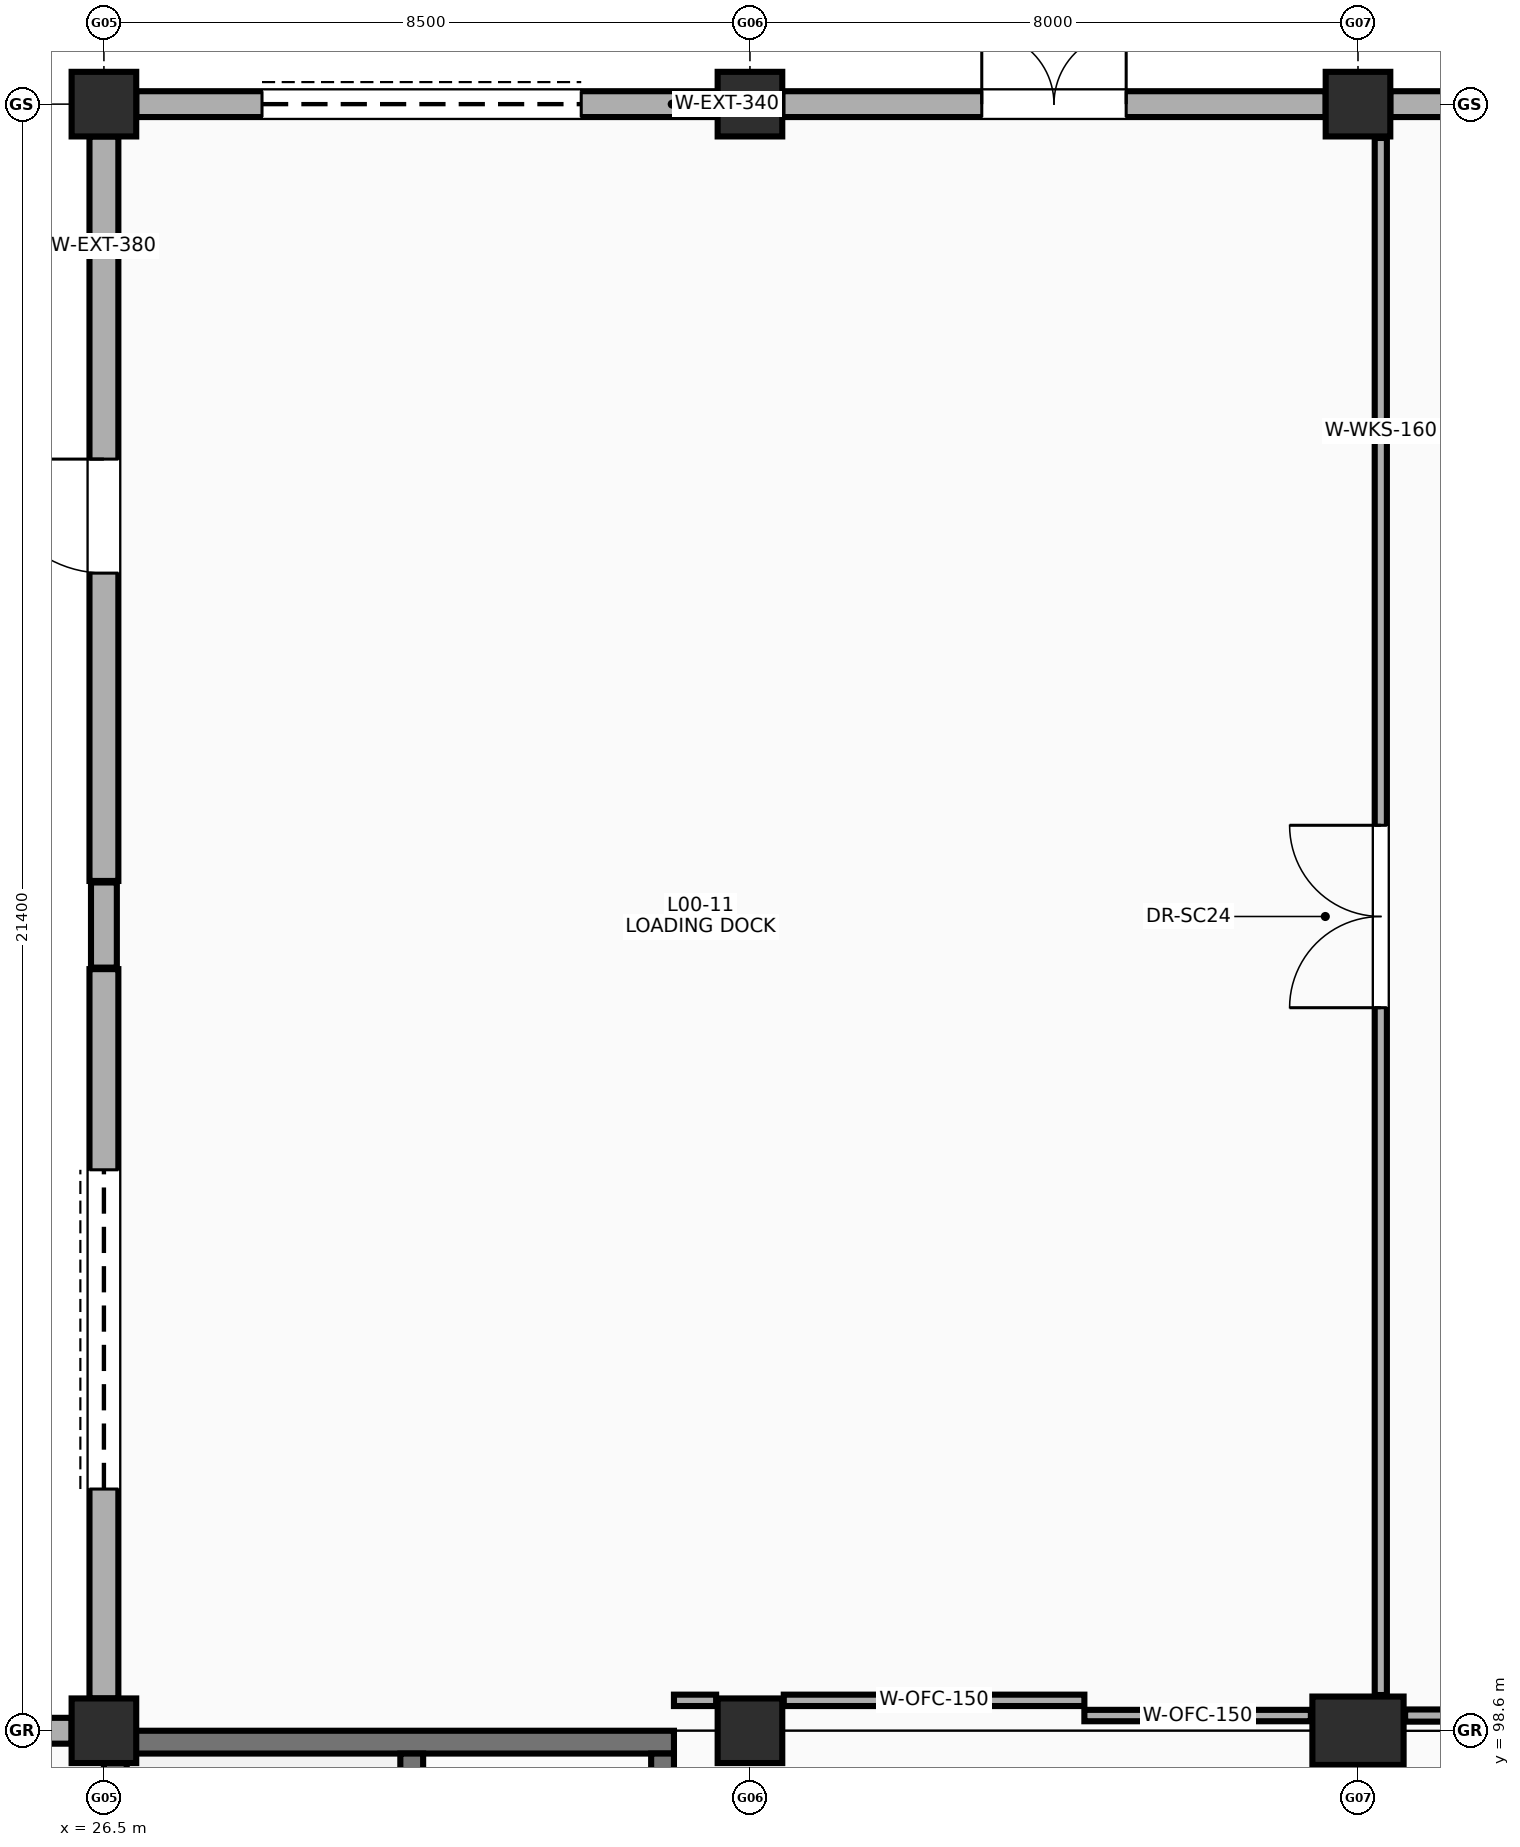
"""IFC4 building model, lengths in metres.
Left out: names, types, materials, properties, quantities, classifications, styles, units other than length and angle.
Written with IfcOpenShell. Run it as: python <this file> out.ifc"""

import sys

from ifc_helpers import new_model, si_unit, direction, frame, frame_2d, origin, origin_2d, place, context, subcontext, project, spatial, rectangle, extrude, element, fill, save


model = new_model("IFC4")
c1 = context("Model", 3, precision=1e-05, world=origin(), true_north=direction((0.0, 1.0)))
c2 = subcontext(c1, "Body", "Model", "MODEL_VIEW")
j1 = project(units=[si_unit("LENGTHUNIT", "METRE"), si_unit("PLANEANGLEUNIT", "RADIAN")], contexts=[c1])
p1 = place(None, origin())
s1 = spatial("IfcSite", under=j1, at=p1, CompositionType="ELEMENT")
p2 = place(p1, origin())
s2 = spatial("IfcBuilding", under=s1, at=p2, CompositionType="ELEMENT")
p3 = place(p2, origin())
s3 = spatial("IfcBuildingStorey", under=s2, at=p3, CompositionType="ELEMENT", Elevation=0.0)
for number, where, z_axis, x_axis in (
    (1, (26.5, 98.6, 0.0), (0.0, 0.0, 1.0), (1.0, 0.0, 0.0)),
    (2, (26.5, 120.0, 0.0), (0.0, 0.0, 1.0), (1.0, 0.0, 0.0)),
    (3, (35.0, 98.6, 0.0), (0.0, 0.0, 1.0), (1.0, 0.0, 0.0)),
    (4, (35.0, 120.0, 0.0), (0.0, 0.0, 1.0), (1.0, 0.0, 0.0)),
):
    element("IfcColumn", number, at=place(p3, frame(where, z_axis=z_axis, x_axis=x_axis)), inside=s3, PredefinedType="COLUMN", context=c2, shape_type="SweptSolid", body=[
        extrude(rectangle(XDim=0.85, YDim=0.85, at=origin_2d()), origin(), (0.0, 0.0, 1.0), 5.4),
    ])
p4 = place(p3, frame((43.0, 98.6, 0.0), z_axis=(0.0, 0.0, 1.0), x_axis=(1.0, 0.0, 0.0)))
e5 = element("IfcColumn", 5, at=p4, inside=s3, PredefinedType="COLUMN", context=c2, shape_type="SweptSolid", body=[
    extrude(rectangle(XDim=1.2, YDim=0.9, at=origin_2d()), origin(), (0.0, 0.0, 1.0), 5.4),
])
p5 = place(p3, frame((43.0, 120.0, 0.0), z_axis=(0.0, 0.0, 1.0), x_axis=(1.0, 0.0, 0.0)))
e6 = element("IfcColumn", 6, at=p5, inside=s3, PredefinedType="COLUMN", context=c2, shape_type="SweptSolid", body=[
    extrude(rectangle(XDim=0.85, YDim=0.85, at=origin_2d()), origin(), (0.0, 0.0, 1.0), 5.4),
])
p6 = place(p3, frame((26.5, 98.45, 0.0), z_axis=(0.0, 0.0, 1.0), x_axis=(1.0, 0.0, 0.0)))
e7 = element("IfcWall", 7, at=p6, inside=s3, PredefinedType="SHEAR", context=c2, shape_type="SweptSolid", body=[
    extrude(rectangle(XDim=7.5, YDim=0.3, at=frame_2d((3.75, 0.0))), origin(), (0.0, 0.0, 1.0), 5.4),
])
for number, where, z_axis, x_axis in (
    (8, (26.65, 90.1, 0.0), (0.0, 0.0, 1.0), (0.0, 1.0, 0.0)),
    (9, (33.85, 90.1, 0.0), (0.0, 0.0, 1.0), (0.0, 1.0, 0.0)),
    (10, (30.55, 90.1, 0.0), (0.0, 0.0, 1.0), (0.0, 1.0, 0.0)),
):
    element("IfcWall", number, at=place(p3, frame(where, z_axis=z_axis, x_axis=x_axis)), inside=s3, PredefinedType="SHEAR", context=c2, shape_type="SweptSolid", body=[
        extrude(rectangle(XDim=8.2, YDim=0.3, at=frame_2d((4.1, 0.0))), origin(), (0.0, 0.0, 1.0), 5.4),
    ])
p7 = place(p3, frame((26.925, 120.0, 0.0), z_axis=(0.0, 0.0, 1.0), x_axis=(1.0, 0.0, 0.0)))
e11 = element("IfcWall", 11, at=p7, inside=s3, PredefinedType="SOLIDWALL", context=c2, shape_type="SweptSolid", body=[
    extrude(rectangle(XDim=7.65, YDim=0.34, at=frame_2d((3.825, 0.0))), origin(), (0.0, 0.0, 1.0), 3.9),
])
p8 = place(p7, frame((1.655, 0.0, 0.0)))
e12 = element("IfcOpeningElement", 12, at=p8, cuts=e11, PredefinedType="OPENING", context=c2, shape_type="SweptSolid", body=[
    extrude(rectangle(XDim=4.2, YDim=3.6, at=frame_2d((2.1, 1.8))), frame((0.0, 0.18, 0.0), z_axis=(0.0, -1.0, 0.0), x_axis=(1.0, 0.0, 0.0)), (0.0, 0.0, 1.0), 0.36),
])
p9 = place(p3, frame((35.425, 120.0, 0.0), z_axis=(0.0, 0.0, 1.0), x_axis=(1.0, 0.0, 0.0)))
e13 = element("IfcWall", 13, at=p9, inside=s3, PredefinedType="SOLIDWALL", context=c2, shape_type="SweptSolid", body=[
    extrude(rectangle(XDim=7.15, YDim=0.34, at=frame_2d((3.575, 0.0))), origin(), (0.0, 0.0, 1.0), 3.9),
])
p10 = place(p9, frame((2.625, 0.0, 0.0)))
e14 = element("IfcOpeningElement", 14, at=p10, cuts=e13, PredefinedType="OPENING", context=c2, shape_type="SweptSolid", body=[
    extrude(rectangle(XDim=1.9, YDim=2.35, at=frame_2d((0.95, 1.175))), frame((0.0, 0.18, 0.0), z_axis=(0.0, -1.0, 0.0), x_axis=(1.0, 0.0, 0.0)), (0.0, 0.0, 1.0), 0.36),
])
p11 = place(p3, frame((43.425, 120.0, 0.0), z_axis=(0.0, 0.0, 1.0), x_axis=(1.0, 0.0, 0.0)))
e15 = element("IfcWall", 15, at=p11, inside=s3, PredefinedType="SOLIDWALL", context=c2, shape_type="SweptSolid", body=[
    extrude(rectangle(XDim=6.65, YDim=0.34, at=frame_2d((3.325, 0.0))), origin(), (0.0, 0.0, 1.0), 3.9),
])
p12 = place(p11, frame((1.405, 0.0, 0.0)))
e16 = element("IfcOpeningElement", 16, at=p12, cuts=e15, PredefinedType="OPENING", context=c2, shape_type="SweptSolid", body=[
    extrude(rectangle(XDim=3.8, YDim=3.5, at=frame_2d((1.9, 1.75))), frame((0.0, 0.18, 0.0), z_axis=(0.0, -1.0, 0.0), x_axis=(1.0, 0.0, 0.0)), (0.0, 0.0, 1.0), 0.36),
])
p13 = place(p3, frame((26.5, 99.025, 0.0), z_axis=(0.0, 0.0, 1.0), x_axis=(0.0, 1.0, 0.0)))
e17 = element("IfcWall", 17, at=p13, inside=s3, PredefinedType="SOLIDWALL", context=c2, shape_type="SweptSolid", body=[
    extrude(rectangle(XDim=9.595, YDim=0.38, at=frame_2d((4.798, 0.0))), origin(), (0.0, 0.0, 1.0), 3.9),
])
p14 = place(p13, frame((2.755, 0.0, 0.0)))
e18 = element("IfcOpeningElement", 18, at=p14, cuts=e17, PredefinedType="OPENING", context=c2, shape_type="SweptSolid", body=[
    extrude(rectangle(XDim=4.2, YDim=3.6, at=frame_2d((2.1, 1.8))), frame((0.0, 0.2, 0.0), z_axis=(0.0, -1.0, 0.0), x_axis=(1.0, 0.0, 0.0)), (0.0, 0.0, 1.0), 0.4),
])
p15 = place(p3, frame((26.5, 109.78, 0.0), z_axis=(0.0, 0.0, 1.0), x_axis=(0.0, 1.0, 0.0)))
e19 = element("IfcWall", 19, at=p15, inside=s3, PredefinedType="SOLIDWALL", context=c2, shape_type="SweptSolid", body=[
    extrude(rectangle(XDim=9.795, YDim=0.38, at=frame_2d((4.897, 0.0))), origin(), (0.0, 0.0, 1.0), 3.9),
])
p16 = place(p15, frame((4.05, 0.0, 0.0)))
e20 = element("IfcOpeningElement", 20, at=p16, cuts=e19, PredefinedType="OPENING", context=c2, shape_type="SweptSolid", body=[
    extrude(rectangle(XDim=1.5, YDim=2.25, at=frame_2d((0.75, 1.125))), frame((0.0, 0.2, 0.0), z_axis=(0.0, -1.0, 0.0), x_axis=(1.0, 0.0, 0.0)), (0.0, 0.0, 1.0), 0.4),
])
p17 = place(p3, frame((19.425, 98.6, 0.0), z_axis=(0.0, 0.0, 1.0), x_axis=(1.0, 0.0, 0.0)))
e21 = element("IfcWall", 21, at=p17, inside=s3, PredefinedType="SOLIDWALL", context=c2, shape_type="SweptSolid", body=[
    extrude(rectangle(XDim=6.65, YDim=0.34, at=frame_2d((3.325, 0.0))), origin(), (0.0, 0.0, 1.0), 3.9),
])
p18 = place(p3, frame((43.3, 99.07, 0.0), z_axis=(0.0, 0.0, 1.0), x_axis=(0.0, 1.0, 0.0)))
e22 = element("IfcWall", 22, at=p18, inside=s3, PredefinedType="PARTITIONING", context=c2, shape_type="SweptSolid", body=[
    extrude(rectangle(XDim=20.485, YDim=0.16, at=frame_2d((10.242, 0.0))), origin(), (0.0, 0.0, 1.0), 3.9),
])
p19 = place(p18, frame((9.042, 0.0, 0.0)))
e23 = element("IfcOpeningElement", 23, at=p19, cuts=e22, PredefinedType="OPENING", context=c2, shape_type="SweptSolid", body=[
    extrude(rectangle(XDim=2.4, YDim=2.6, at=frame_2d((1.2, 1.3))), frame((0.0, 0.09, 0.0), z_axis=(0.0, -1.0, 0.0), x_axis=(1.0, 0.0, 0.0)), (0.0, 0.0, 1.0), 0.18),
])
p20 = place(p3, frame((43.62, 98.8, 0.0), z_axis=(0.0, 0.0, 1.0), x_axis=(1.0, 0.0, 0.0)))
e24 = element("IfcWall", 24, at=p20, inside=s3, PredefinedType="PARTITIONING", context=c2, shape_type="SweptSolid", body=[
    extrude(rectangle(XDim=6.435, YDim=0.16, at=frame_2d((3.217, 0.0))), origin(), (0.0, 0.0, 1.0), 3.9),
])
p21 = place(p3, frame((39.4, 98.8, 0.0), z_axis=(0.0, 0.0, 1.0), x_axis=(1.0, 0.0, 0.0)))
e25 = element("IfcWall", 25, at=p21, inside=s3, PredefinedType="PARTITIONING", context=c2, shape_type="SweptSolid", body=[
    extrude(rectangle(XDim=2.98, YDim=0.15, at=frame_2d((1.49, 0.0))), origin(), (0.0, 0.0, 1.0), 4.2),
])
p22 = place(p3, frame((34.0, 99.0, 0.0), z_axis=(0.0, 0.0, 1.0), x_axis=(1.0, 0.0, 0.0)))
e26 = element("IfcWall", 26, at=p22, inside=s3, PredefinedType="PARTITIONING", context=c2, shape_type="SweptSolid", body=[
    extrude(rectangle(XDim=0.555, YDim=0.15, at=frame_2d((0.277, 0.0))), origin(), (0.0, 0.0, 1.0), 3.9),
])
p23 = place(p3, frame((35.445, 99.0, 0.0), z_axis=(0.0, 0.0, 1.0), x_axis=(1.0, 0.0, 0.0)))
e27 = element("IfcWall", 27, at=p23, inside=s3, PredefinedType="PARTITIONING", context=c2, shape_type="SweptSolid", body=[
    extrude(rectangle(XDim=3.955, YDim=0.15, at=frame_2d((1.978, 0.0))), origin(), (0.0, 0.0, 1.0), 3.9),
])
p24 = place(p3, frame((26.5, 108.64, 0.0), z_axis=(0.0, 0.0, 1.0), x_axis=(0.0, 1.0, 0.0)))
e28 = element("IfcWall", 28, at=p24, inside=s3, PredefinedType="SOLIDWALL", context=c2, shape_type="SweptSolid", body=[
    extrude(rectangle(XDim=1.12, YDim=0.34, at=frame_2d((0.56, 0.0))), origin(), (0.0, 0.0, 1.0), 3.9),
])
p25 = place(p8, origin())
e29 = element("IfcDoor", 29, at=p25, inside=s3, OperationType="ROLLINGUP", PredefinedType="DOOR", context=c2, shape_type="SweptSolid", body=[
    extrude(rectangle(XDim=4.2, YDim=3.6, at=frame_2d((2.1, 1.8))), frame((0.0, 0.025, 0.0), z_axis=(0.0, -1.0, 0.0), x_axis=(1.0, 0.0, 0.0)), (0.0, 0.0, 1.0), 0.05),
])
fill(e12, e29)
p26 = place(p10, origin())
e30 = element("IfcDoor", 30, at=p26, inside=s3, OperationType="DOUBLE_DOOR_SINGLE_SWING", PredefinedType="DOOR", context=c2, shape_type="SweptSolid", body=[
    extrude(rectangle(XDim=1.9, YDim=2.35, at=frame_2d((0.95, 1.175))), frame((0.0, 0.025, 0.0), z_axis=(0.0, -1.0, 0.0), x_axis=(1.0, 0.0, 0.0)), (0.0, 0.0, 1.0), 0.05),
])
fill(e14, e30)
p27 = place(p14, origin())
e31 = element("IfcDoor", 31, at=p27, inside=s3, OperationType="ROLLINGUP", PredefinedType="DOOR", context=c2, shape_type="SweptSolid", body=[
    extrude(rectangle(XDim=4.2, YDim=3.6, at=frame_2d((2.1, 1.8))), frame((0.0, 0.025, 0.0), z_axis=(0.0, -1.0, 0.0), x_axis=(1.0, 0.0, 0.0)), (0.0, 0.0, 1.0), 0.05),
])
fill(e18, e31)
p28 = place(p16, origin())
e32 = element("IfcDoor", 32, at=p28, inside=s3, OperationType="SINGLE_SWING_RIGHT", PredefinedType="DOOR", context=c2, shape_type="SweptSolid", body=[
    extrude(rectangle(XDim=1.5, YDim=2.25, at=frame_2d((0.75, 1.125))), frame((0.0, 0.025, 0.0), z_axis=(0.0, -1.0, 0.0), x_axis=(1.0, 0.0, 0.0)), (0.0, 0.0, 1.0), 0.05),
])
fill(e20, e32)
p29 = place(p19, origin())
e33 = element("IfcDoor", 33, at=p29, inside=s3, OperationType="DOUBLE_DOOR_SINGLE_SWING", PredefinedType="DOOR", context=c2, shape_type="SweptSolid", body=[
    extrude(rectangle(XDim=2.4, YDim=2.6, at=frame_2d((1.2, 1.3))), frame((0.0, 0.025, 0.0), z_axis=(0.0, -1.0, 0.0), x_axis=(1.0, 0.0, 0.0)), (0.0, 0.0, 1.0), 0.05),
])
fill(e23, e33)
save(model, sys.argv[1])
